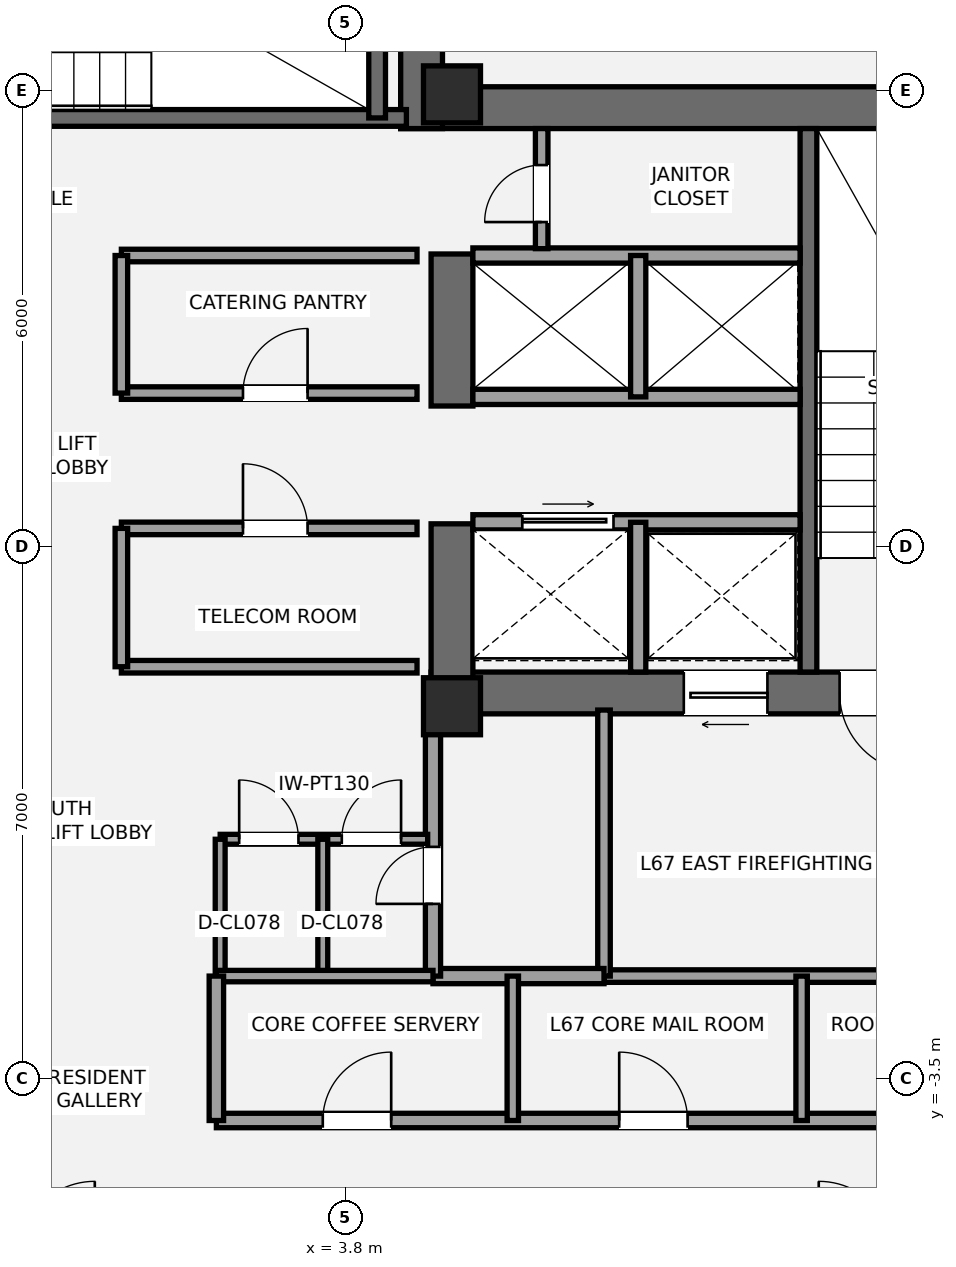
"""IFC4 building model, lengths in metres.
Left out: names, types, materials, properties, quantities, classifications, styles, units other than length and angle.
Written with IfcOpenShell. Run it as: python <this file> out.ifc"""

import sys

from ifc_helpers import new_model, si_unit, direction, frame, frame_2d, origin, origin_2d, place, context, subcontext, project, spatial, rectangle, extrude, element, fill, save


model = new_model("IFC4")
c1 = context("Model", 3, precision=1e-05, world=origin(), true_north=direction((0.0, 1.0)))
c2 = subcontext(c1, "Body", "Model", "MODEL_VIEW")
j1 = project(units=[si_unit("LENGTHUNIT", "METRE"), si_unit("PLANEANGLEUNIT", "RADIAN")], contexts=[c1])
p1 = place(None, origin())
s1 = spatial("IfcSite", under=j1, at=p1, CompositionType="ELEMENT")
p2 = place(p1, origin())
s2 = spatial("IfcBuilding", under=s1, at=p2, CompositionType="ELEMENT")
p3 = place(p2, frame((0.0, 0.0, 238.35)))
s3 = spatial("IfcBuildingStorey", under=s2, at=p3, CompositionType="ELEMENT", Elevation=238.35)
p4 = place(p3, frame((4.525, 9.275, 0.0), z_axis=(0.0, 0.0, 1.0), x_axis=(1.0, 0.0, 0.0)))
e1 = element("IfcWall", 1, at=p4, inside=s3, PredefinedType="SHEAR", context=c2, shape_type="SweptSolid", body=[
    extrude(rectangle(XDim=9.175, YDim=0.55, at=frame_2d((4.587, 0.0))), origin(), (0.0, 0.0, 1.0), 3.15),
])
p5 = place(p3, frame((13.7, 1.575, 0.0), z_axis=(0.0, 0.0, 1.0), x_axis=(-1.0, 0.0, 0.0)))
e2 = element("IfcWall", 2, at=p5, inside=s3, PredefinedType="SHEAR", context=c2, shape_type="SweptSolid", body=[
    extrude(rectangle(XDim=8.775, YDim=0.55, at=frame_2d((4.387, 0.0))), origin(), (0.0, 0.0, 1.0), 3.15),
])
p6 = place(p5, frame((2.35, 0.0, 0.0)))
e3 = element("IfcOpeningElement", 3, at=p6, cuts=e2, PredefinedType="OPENING", context=c2, shape_type="SweptSolid", body=[
    extrude(rectangle(XDim=1.05, YDim=2.15, at=frame_2d((0.525, 1.075))), frame((0.0, 0.285, 0.0), z_axis=(0.0, -1.0, 0.0), x_axis=(1.0, 0.0, 0.0)), (0.0, 0.0, 1.0), 0.57),
])
p7 = place(p5, frame((4.35, 0.0, 0.0)))
e4 = element("IfcOpeningElement", 4, at=p7, cuts=e2, PredefinedType="OPENING", context=c2, shape_type="SweptSolid", body=[
    extrude(rectangle(XDim=1.1, YDim=2.2, at=frame_2d((0.55, 1.1))), frame((0.0, 0.285, 0.0), z_axis=(0.0, -1.0, 0.0), x_axis=(1.0, 0.0, 0.0)), (0.0, 0.0, 1.0), 0.57),
])
p8 = place(p3, frame((5.2, 1.3, 0.0), z_axis=(0.0, 0.0, 1.0), x_axis=(0.0, 1.0, 0.0)))
e5 = element("IfcWall", 5, at=p8, inside=s3, PredefinedType="SHEAR", context=c2, shape_type="SweptSolid", body=[
    extrude(rectangle(XDim=2.5, YDim=0.55, at=frame_2d((1.25, 0.0))), origin(), (0.0, 0.0, 1.0), 3.15),
])
p9 = place(p3, frame((5.2, 5.35, 0.0), z_axis=(0.0, 0.0, 1.0), x_axis=(0.0, 1.0, 0.0)))
e6 = element("IfcWall", 6, at=p9, inside=s3, PredefinedType="SHEAR", context=c2, shape_type="SweptSolid", body=[
    extrude(rectangle(XDim=2.0, YDim=0.55, at=frame_2d((1.0, 0.0))), origin(), (0.0, 0.0, 1.0), 3.15),
])
p10 = place(p3, frame((9.89, 1.85, 0.0), z_axis=(0.0, 0.0, 1.0), x_axis=(0.0, 1.0, 0.0)))
e7 = element("IfcWall", 7, at=p10, inside=s3, PredefinedType="SHEAR", context=c2, shape_type="SweptSolid", body=[
    extrude(rectangle(XDim=7.15, YDim=0.22, at=frame_2d((3.575, 0.0))), origin(), (0.0, 0.0, 1.0), 3.15),
])
p11 = place(p3, frame((4.8, 9.0, 0.0), z_axis=(0.0, 0.0, 1.0), x_axis=(0.0, 1.0, 0.0)))
e8 = element("IfcWall", 8, at=p11, inside=s3, PredefinedType="SHEAR", context=c2, shape_type="SweptSolid", body=[
    extrude(rectangle(XDim=3.95, YDim=0.55, at=frame_2d((1.975, 0.0))), origin(), (0.0, 0.0, 1.0), 3.15),
])
p12 = place(p3, frame((-4.7, 9.14, 0.0), z_axis=(0.0, 0.0, 1.0), x_axis=(1.0, 0.0, 0.0)))
e9 = element("IfcWall", 9, at=p12, inside=s3, PredefinedType="SHEAR", context=c2, shape_type="SweptSolid", body=[
    extrude(rectangle(XDim=9.3, YDim=0.22, at=frame_2d((4.65, 0.0))), origin(), (0.0, 0.0, 1.0), 3.15),
])
p13 = place(p12, frame((1.15, 0.0, 0.0)))
e10 = element("IfcOpeningElement", 10, at=p13, cuts=e9, PredefinedType="OPENING", context=c2, shape_type="SweptSolid", body=[
    extrude(rectangle(XDim=1.05, YDim=2.15, at=frame_2d((0.525, 1.075))), frame((0.0, 0.12, 0.0), z_axis=(0.0, -1.0, 0.0), x_axis=(1.0, 0.0, 0.0)), (0.0, 0.0, 1.0), 0.24),
])
p14 = place(p3, frame((4.215, 9.14, 0.0), z_axis=(0.0, 0.0, 1.0), x_axis=(0.0, 1.0, 0.0)))
e11 = element("IfcWall", 11, at=p14, inside=s3, PredefinedType="SHEAR", context=c2, shape_type="SweptSolid", body=[
    extrude(rectangle(XDim=3.26, YDim=0.22, at=frame_2d((1.63, 0.0))), origin(), (0.0, 0.0, 1.0), 3.15),
])
for number, where, z_axis, x_axis in (
    (12, (5.2, 1.4, 0.0), (0.0, 0.0, 1.0), (1.0, 0.0, 0.0)),
    (13, (5.2, 9.45, 0.0), (0.0, 0.0, 1.0), (1.0, 0.0, 0.0)),
):
    element("IfcColumn", number, at=place(p3, frame(where, z_axis=z_axis, x_axis=x_axis)), inside=s3, PredefinedType="PILASTER", context=c2, shape_type="SweptSolid", body=[
        extrude(rectangle(XDim=0.75, YDim=0.75, at=origin_2d()), origin(), (0.0, 0.0, 1.0), 3.15),
    ])
p15 = place(p3, frame((7.2, -2.15, 0.0), z_axis=(0.0, 0.0, 1.0), x_axis=(1.0, 0.0, 0.0)))
e14 = element("IfcWall", 14, at=p15, inside=s3, PredefinedType="PARTITIONING", context=c2, shape_type="SweptSolid", body=[
    extrude(rectangle(XDim=6.25, YDim=0.165, at=frame_2d((3.125, 0.0))), origin(), (0.0, 0.0, 1.0), 2.97),
])
p16 = place(p3, frame((7.2, -2.15, 0.0), z_axis=(0.0, 0.0, 1.0), x_axis=(0.0, 1.0, 0.0)))
e15 = element("IfcWall", 15, at=p16, inside=s3, PredefinedType="PARTITIONING", context=c2, shape_type="SweptSolid", body=[
    extrude(rectangle(XDim=3.5, YDim=0.165, at=frame_2d((1.75, 0.0))), origin(), (0.0, 0.0, 1.0), 2.423),
])
p17 = place(p3, frame((4.95, -2.15, 0.0), z_axis=(0.0, 0.0, 1.0), x_axis=(1.0, 0.0, 0.0)))
e16 = element("IfcWall", 16, at=p17, inside=s3, PredefinedType="SOLIDWALL", context=c2, shape_type="SweptSolid", body=[
    extrude(rectangle(XDim=2.25, YDim=0.2, at=frame_2d((1.125, 0.0))), origin(), (0.0, 0.0, 1.0), 2.97),
])
p18 = place(p3, frame((4.95, -2.15, 0.0), z_axis=(0.0, 0.0, 1.0), x_axis=(0.0, 1.0, 0.0)))
e17 = element("IfcWall", 17, at=p18, inside=s3, PredefinedType="SOLIDWALL", context=c2, shape_type="SweptSolid", body=[
    extrude(rectangle(XDim=3.5, YDim=0.2, at=frame_2d((1.75, 0.0))), origin(), (0.0, 0.0, 1.0), 2.423),
])
p19 = place(p18, frame((0.95, 0.0, 0.0)))
e18 = element("IfcOpeningElement", 18, at=p19, cuts=e17, PredefinedType="OPENING", context=c2, shape_type="SweptSolid", body=[
    extrude(rectangle(XDim=0.75, YDim=2.1, at=frame_2d((0.375, 1.05))), frame((0.0, 0.11, 0.0), z_axis=(0.0, -1.0, 0.0), x_axis=(1.0, 0.0, 0.0)), (0.0, 0.0, 1.0), 0.22),
])
p20 = place(p3, frame((2.15, -0.35, 0.0), z_axis=(0.0, 0.0, 1.0), x_axis=(1.0, 0.0, 0.0)))
e19 = element("IfcWall", 19, at=p20, inside=s3, PredefinedType="PARTITIONING", context=c2, shape_type="SweptSolid", body=[
    extrude(rectangle(XDim=2.73, YDim=0.13, at=frame_2d((1.365, 0.0))), origin(), (0.0, 0.0, 1.0), 2.97),
])
p21 = place(p20, frame((0.25, 0.0, 0.0)))
e20 = element("IfcOpeningElement", 20, at=p21, cuts=e19, PredefinedType="OPENING", context=c2, shape_type="SweptSolid", body=[
    extrude(rectangle(XDim=0.78, YDim=2.1, at=frame_2d((0.39, 1.05))), frame((0.0, 0.075, 0.0), z_axis=(0.0, -1.0, 0.0), x_axis=(1.0, 0.0, 0.0)), (0.0, 0.0, 1.0), 0.15),
])
p22 = place(p20, frame((1.6, 0.0, 0.0)))
e21 = element("IfcOpeningElement", 21, at=p22, cuts=e19, PredefinedType="OPENING", context=c2, shape_type="SweptSolid", body=[
    extrude(rectangle(XDim=0.78, YDim=2.1, at=frame_2d((0.39, 1.05))), frame((0.0, 0.075, 0.0), z_axis=(0.0, -1.0, 0.0), x_axis=(1.0, 0.0, 0.0)), (0.0, 0.0, 1.0), 0.15),
])
for number, where, z_axis, x_axis in (
    (22, (2.15, -2.15, 0.0), (0.0, 0.0, 1.0), (0.0, 1.0, 0.0)),
    (23, (3.5, -2.15, 0.0), (0.0, 0.0, 1.0), (0.0, 1.0, 0.0)),
):
    element("IfcWall", number, at=place(p3, frame(where, z_axis=z_axis, x_axis=x_axis)), inside=s3, PredefinedType="PARTITIONING", context=c2, shape_type="SweptSolid", body=[
        extrude(rectangle(XDim=1.8, YDim=0.13, at=frame_2d((0.9, 0.0))), origin(), (0.0, 0.0, 1.0), 2.97),
    ])
p23 = place(p3, frame((5.475, 3.82, 0.0), z_axis=(0.0, 0.0, 1.0), x_axis=(1.0, 0.0, 0.0)))
e24 = element("IfcWall", 24, at=p23, inside=s3, PredefinedType="SOLIDWALL", context=c2, shape_type="SweptSolid", body=[
    extrude(rectangle(XDim=4.305, YDim=0.2, at=frame_2d((2.152, 0.0))), origin(), (0.0, 0.0, 1.0), 2.97),
])
p24 = place(p23, frame((0.65, 0.0, 0.0)))
e25 = element("IfcOpeningElement", 25, at=p24, cuts=e24, PredefinedType="OPENING", context=c2, shape_type="SweptSolid", body=[
    extrude(rectangle(XDim=1.2, YDim=2.2, at=frame_2d((0.6, 1.1))), frame((0.0, 0.11, 0.0), z_axis=(0.0, -1.0, 0.0), x_axis=(1.0, 0.0, 0.0)), (0.0, 0.0, 1.0), 0.22),
])
p25 = place(p3, frame((7.65, 1.85, 0.0), z_axis=(0.0, 0.0, 1.0), x_axis=(0.0, 1.0, 0.0)))
e26 = element("IfcWall", 26, at=p25, inside=s3, PredefinedType="SOLIDWALL", context=c2, shape_type="SweptSolid", body=[
    extrude(rectangle(XDim=1.97, YDim=0.2, at=frame_2d((0.985, 0.0))), origin(), (0.0, 0.0, 1.0), 2.97),
])
for number, where, z_axis, x_axis in (
    (27, (5.475, 5.47, 0.0), (0.0, 0.0, 1.0), (1.0, 0.0, 0.0)),
    (28, (5.475, 7.33, 0.0), (0.0, 0.0, 1.0), (1.0, 0.0, 0.0)),
):
    element("IfcWall", number, at=place(p3, frame(where, z_axis=z_axis, x_axis=x_axis)), inside=s3, PredefinedType="SOLIDWALL", context=c2, shape_type="SweptSolid", body=[
        extrude(rectangle(XDim=4.305, YDim=0.2, at=frame_2d((2.152, 0.0))), origin(), (0.0, 0.0, 1.0), 2.97),
    ])
p26 = place(p3, frame((7.65, 5.47, 0.0), z_axis=(0.0, 0.0, 1.0), x_axis=(0.0, 1.0, 0.0)))
e29 = element("IfcWall", 29, at=p26, inside=s3, PredefinedType="SOLIDWALL", context=c2, shape_type="SweptSolid", body=[
    extrude(rectangle(XDim=1.86, YDim=0.2, at=frame_2d((0.93, 0.0))), origin(), (0.0, 0.0, 1.0), 2.97),
])
p27 = place(p3, frame((0.85, 1.92, 0.0), z_axis=(0.0, 0.0, 1.0), x_axis=(1.0, 0.0, 0.0)))
e30 = element("IfcWall", 30, at=p27, inside=s3, PredefinedType="PARTITIONING", context=c2, shape_type="SweptSolid", body=[
    extrude(rectangle(XDim=3.89, YDim=0.165, at=frame_2d((1.945, 0.0))), origin(), (0.0, 0.0, 1.0), 2.11),
])
p28 = place(p3, frame((0.85, 3.74, 0.0), z_axis=(0.0, 0.0, 1.0), x_axis=(1.0, 0.0, 0.0)))
e31 = element("IfcWall", 31, at=p28, inside=s3, PredefinedType="PARTITIONING", context=c2, shape_type="SweptSolid", body=[
    extrude(rectangle(XDim=3.89, YDim=0.165, at=frame_2d((1.945, 0.0))), origin(), (0.0, 0.0, 1.0), 2.97),
])
p29 = place(p28, frame((1.6, 0.0, 0.0)))
e32 = element("IfcOpeningElement", 32, at=p29, cuts=e31, PredefinedType="OPENING", context=c2, shape_type="SweptSolid", body=[
    extrude(rectangle(XDim=0.85, YDim=2.1, at=frame_2d((0.425, 1.05))), frame((0.0, 0.093, 0.0), z_axis=(0.0, -1.0, 0.0), x_axis=(1.0, 0.0, 0.0)), (0.0, 0.0, 1.0), 0.185),
])
p30 = place(p3, frame((0.85, 1.92, 0.0), z_axis=(0.0, 0.0, 1.0), x_axis=(0.0, 1.0, 0.0)))
e33 = element("IfcWall", 33, at=p30, inside=s3, PredefinedType="PARTITIONING", context=c2, shape_type="SweptSolid", body=[
    extrude(rectangle(XDim=1.82, YDim=0.165, at=frame_2d((0.91, 0.0))), origin(), (0.0, 0.0, 1.0), 2.97),
])
p31 = place(p3, frame((0.85, 5.52, 0.0), z_axis=(0.0, 0.0, 1.0), x_axis=(1.0, 0.0, 0.0)))
e34 = element("IfcWall", 34, at=p31, inside=s3, PredefinedType="PARTITIONING", context=c2, shape_type="SweptSolid", body=[
    extrude(rectangle(XDim=3.89, YDim=0.165, at=frame_2d((1.945, 0.0))), origin(), (0.0, 0.0, 1.0), 2.97),
])
p32 = place(p31, frame((1.6, 0.0, 0.0)))
e35 = element("IfcOpeningElement", 35, at=p32, cuts=e34, PredefinedType="OPENING", context=c2, shape_type="SweptSolid", body=[
    extrude(rectangle(XDim=0.85, YDim=2.1, at=frame_2d((0.425, 1.05))), frame((0.0, 0.093, 0.0), z_axis=(0.0, -1.0, 0.0), x_axis=(1.0, 0.0, 0.0)), (0.0, 0.0, 1.0), 0.185),
])
p33 = place(p3, frame((0.85, 7.33, 0.0), z_axis=(0.0, 0.0, 1.0), x_axis=(1.0, 0.0, 0.0)))
e36 = element("IfcWall", 36, at=p33, inside=s3, PredefinedType="PARTITIONING", context=c2, shape_type="SweptSolid", body=[
    extrude(rectangle(XDim=3.89, YDim=0.165, at=frame_2d((1.945, 0.0))), origin(), (0.0, 0.0, 1.0), 2.97),
])
p34 = place(p3, frame((0.85, 5.52, 0.0), z_axis=(0.0, 0.0, 1.0), x_axis=(0.0, 1.0, 0.0)))
e37 = element("IfcWall", 37, at=p34, inside=s3, PredefinedType="PARTITIONING", context=c2, shape_type="SweptSolid", body=[
    extrude(rectangle(XDim=1.81, YDim=0.165, at=frame_2d((0.905, 0.0))), origin(), (0.0, 0.0, 1.0), 2.97),
])
p35 = place(p3, frame((6.38, 7.42, 0.0), z_axis=(0.0, 0.0, 1.0), x_axis=(0.0, 1.0, 0.0)))
e38 = element("IfcWall", 38, at=p35, inside=s3, PredefinedType="PARTITIONING", context=c2, shape_type="SweptSolid", body=[
    extrude(rectangle(XDim=1.58, YDim=0.165, at=frame_2d((0.79, 0.0))), origin(), (0.0, 0.0, 1.0), 2.97),
])
p36 = place(p35, frame((0.35, 0.0, 0.0)))
e39 = element("IfcOpeningElement", 39, at=p36, cuts=e38, PredefinedType="OPENING", context=c2, shape_type="SweptSolid", body=[
    extrude(rectangle(XDim=0.75, YDim=2.1, at=frame_2d((0.375, 1.05))), frame((0.0, 0.093, 0.0), z_axis=(0.0, -1.0, 0.0), x_axis=(1.0, 0.0, 0.0)), (0.0, 0.0, 1.0), 0.185),
])
p37 = place(p3, frame((2.1, -4.05, 0.0), z_axis=(0.0, 0.0, 1.0), x_axis=(1.0, 0.0, 0.0)))
e40 = element("IfcWall", 40, at=p37, inside=s3, PredefinedType="PLUMBINGWALL", context=c2, shape_type="SweptSolid", body=[
    extrude(rectangle(XDim=11.35, YDim=0.19, at=frame_2d((5.675, 0.0))), origin(), (0.0, 0.0, 1.0), 2.357),
])
p38 = place(p37, frame((1.4, 0.0, 0.0)))
e41 = element("IfcOpeningElement", 41, at=p38, cuts=e40, PredefinedType="OPENING", context=c2, shape_type="SweptSolid", body=[
    extrude(rectangle(XDim=0.9, YDim=2.1, at=frame_2d((0.45, 1.05))), frame((0.0, 0.105, 0.0), z_axis=(0.0, -1.0, 0.0), x_axis=(1.0, 0.0, 0.0)), (0.0, 0.0, 1.0), 0.21),
])
p39 = place(p37, frame((5.3, 0.0, 0.0)))
e42 = element("IfcOpeningElement", 42, at=p39, cuts=e40, PredefinedType="OPENING", context=c2, shape_type="SweptSolid", body=[
    extrude(rectangle(XDim=0.9, YDim=2.1, at=frame_2d((0.45, 1.05))), frame((0.0, 0.105, 0.0), z_axis=(0.0, -1.0, 0.0), x_axis=(1.0, 0.0, 0.0)), (0.0, 0.0, 1.0), 0.21),
])
p40 = place(p37, frame((9.1, 0.0, 0.0)))
e43 = element("IfcOpeningElement", 43, at=p40, cuts=e40, PredefinedType="OPENING", context=c2, shape_type="SweptSolid", body=[
    extrude(rectangle(XDim=0.9, YDim=2.1, at=frame_2d((0.45, 1.05))), frame((0.0, 0.105, 0.0), z_axis=(0.0, -1.0, 0.0), x_axis=(1.0, 0.0, 0.0)), (0.0, 0.0, 1.0), 0.21),
])
p41 = place(p3, frame((2.1, -2.15, 0.0), z_axis=(0.0, 0.0, 1.0), x_axis=(1.0, 0.0, 0.0)))
e44 = element("IfcWall", 44, at=p41, inside=s3, PredefinedType="PLUMBINGWALL", context=c2, shape_type="SweptSolid", body=[
    extrude(rectangle(XDim=2.85, YDim=0.15, at=frame_2d((1.425, 0.0))), origin(), (0.0, 0.0, 1.0), 2.97),
])
p42 = place(p3, frame((2.1, -4.05, 0.0), z_axis=(0.0, 0.0, 1.0), x_axis=(0.0, 1.0, 0.0)))
e45 = element("IfcWall", 45, at=p42, inside=s3, PredefinedType="PLUMBINGWALL", context=c2, shape_type="SweptSolid", body=[
    extrude(rectangle(XDim=1.9, YDim=0.19, at=frame_2d((0.95, 0.0))), origin(), (0.0, 0.0, 1.0), 2.97),
])
p43 = place(p3, frame((6.0, -4.05, 0.0), z_axis=(0.0, 0.0, 1.0), x_axis=(0.0, 1.0, 0.0)))
e46 = element("IfcWall", 46, at=p43, inside=s3, PredefinedType="PLUMBINGWALL", context=c2, shape_type="SweptSolid", body=[
    extrude(rectangle(XDim=1.9, YDim=0.15, at=frame_2d((0.95, 0.0))), origin(), (0.0, 0.0, 1.0), 2.431),
])
p44 = place(p3, frame((9.8, -4.05, 0.0), z_axis=(0.0, 0.0, 1.0), x_axis=(0.0, 1.0, 0.0)))
e47 = element("IfcWall", 47, at=p44, inside=s3, PredefinedType="PLUMBINGWALL", context=c2, shape_type="SweptSolid", body=[
    extrude(rectangle(XDim=1.9, YDim=0.15, at=frame_2d((0.95, 0.0))), origin(), (0.0, 0.0, 1.0), 2.97),
])
p45 = place(p6, origin())
e48 = element("IfcDoor", 48, at=p45, inside=s3, OperationType="SINGLE_SWING_LEFT", PredefinedType="DOOR", context=c2, shape_type="SweptSolid", body=[
    extrude(rectangle(XDim=1.05, YDim=2.15, at=frame_2d((0.525, 1.075))), frame((0.0, 0.025, 0.0), z_axis=(0.0, -1.0, 0.0), x_axis=(1.0, 0.0, 0.0)), (0.0, 0.0, 1.0), 0.05),
])
fill(e3, e48)
p46 = place(p19, origin())
e49 = element("IfcDoor", 49, at=p46, inside=s3, OperationType="SINGLE_SWING_LEFT", PredefinedType="DOOR", context=c2, shape_type="SweptSolid", body=[
    extrude(rectangle(XDim=0.75, YDim=2.1, at=frame_2d((0.375, 1.05))), frame((0.0, 0.025, 0.0), z_axis=(0.0, -1.0, 0.0), x_axis=(1.0, 0.0, 0.0)), (0.0, 0.0, 1.0), 0.05),
])
fill(e18, e49)
p47 = place(p21, origin())
e50 = element("IfcDoor", 50, at=p47, inside=s3, OperationType="SINGLE_SWING_LEFT", PredefinedType="DOOR", context=c2, shape_type="SweptSolid", body=[
    extrude(rectangle(XDim=0.78, YDim=2.1, at=frame_2d((0.39, 1.05))), frame((0.0, 0.025, 0.0), z_axis=(0.0, -1.0, 0.0), x_axis=(1.0, 0.0, 0.0)), (0.0, 0.0, 1.0), 0.05),
])
fill(e20, e50)
p48 = place(p22, origin())
e51 = element("IfcDoor", 51, at=p48, inside=s3, OperationType="SINGLE_SWING_RIGHT", PredefinedType="DOOR", context=c2, shape_type="SweptSolid", body=[
    extrude(rectangle(XDim=0.78, YDim=2.1, at=frame_2d((0.39, 1.05))), frame((0.0, 0.025, 0.0), z_axis=(0.0, -1.0, 0.0), x_axis=(1.0, 0.0, 0.0)), (0.0, 0.0, 1.0), 0.05),
])
fill(e21, e51)
p49 = place(p7, origin())
e52 = element("IfcDoor", 52, at=p49, inside=s3, OperationType="SLIDING_TO_LEFT", PredefinedType="DOOR", context=c2, shape_type="SweptSolid", body=[
    extrude(rectangle(XDim=1.1, YDim=2.2, at=frame_2d((0.55, 1.1))), frame((0.0, 0.025, 0.0), z_axis=(0.0, -1.0, 0.0), x_axis=(1.0, 0.0, 0.0)), (0.0, 0.0, 1.0), 0.05),
])
fill(e4, e52)
p50 = place(p24, origin())
e53 = element("IfcDoor", 53, at=p50, inside=s3, OperationType="SLIDING_TO_RIGHT", PredefinedType="DOOR", context=c2, shape_type="SweptSolid", body=[
    extrude(rectangle(XDim=1.2, YDim=2.2, at=frame_2d((0.6, 1.1))), frame((0.0, 0.025, 0.0), z_axis=(0.0, -1.0, 0.0), x_axis=(1.0, 0.0, 0.0)), (0.0, 0.0, 1.0), 0.05),
])
fill(e25, e53)
p51 = place(p29, origin())
e54 = element("IfcDoor", 54, at=p51, inside=s3, OperationType="SINGLE_SWING_LEFT", PredefinedType="DOOR", context=c2, shape_type="SweptSolid", body=[
    extrude(rectangle(XDim=0.85, YDim=2.1, at=frame_2d((0.425, 1.05))), frame((0.0, 0.025, 0.0), z_axis=(0.0, -1.0, 0.0), x_axis=(1.0, 0.0, 0.0)), (0.0, 0.0, 1.0), 0.05),
])
fill(e32, e54)
p52 = place(p32, origin())
e55 = element("IfcDoor", 55, at=p52, inside=s3, OperationType="SINGLE_SWING_RIGHT", PredefinedType="DOOR", context=c2, shape_type="SweptSolid", body=[
    extrude(rectangle(XDim=0.85, YDim=2.1, at=frame_2d((0.425, 1.05))), frame((0.0, 0.025, 0.0), z_axis=(0.0, -1.0, 0.0), x_axis=(1.0, 0.0, 0.0)), (0.0, 0.0, 1.0), 0.05),
])
fill(e35, e55)
p53 = place(p36, origin())
e56 = element("IfcDoor", 56, at=p53, inside=s3, OperationType="SINGLE_SWING_LEFT", PredefinedType="DOOR", context=c2, shape_type="SweptSolid", body=[
    extrude(rectangle(XDim=0.75, YDim=2.1, at=frame_2d((0.375, 1.05))), frame((0.0, 0.025, 0.0), z_axis=(0.0, -1.0, 0.0), x_axis=(1.0, 0.0, 0.0)), (0.0, 0.0, 1.0), 0.05),
])
fill(e39, e56)
p54 = place(p38, origin())
e57 = element("IfcDoor", 57, at=p54, inside=s3, OperationType="SINGLE_SWING_RIGHT", PredefinedType="DOOR", context=c2, shape_type="SweptSolid", body=[
    extrude(rectangle(XDim=0.9, YDim=2.1, at=frame_2d((0.45, 1.05))), frame((0.0, 0.025, 0.0), z_axis=(0.0, -1.0, 0.0), x_axis=(1.0, 0.0, 0.0)), (0.0, 0.0, 1.0), 0.05),
])
fill(e41, e57)
p55 = place(p39, origin())
e58 = element("IfcDoor", 58, at=p55, inside=s3, OperationType="SINGLE_SWING_LEFT", PredefinedType="DOOR", context=c2, shape_type="SweptSolid", body=[
    extrude(rectangle(XDim=0.9, YDim=2.1, at=frame_2d((0.45, 1.05))), frame((0.0, 0.025, 0.0), z_axis=(0.0, -1.0, 0.0), x_axis=(1.0, 0.0, 0.0)), (0.0, 0.0, 1.0), 0.05),
])
fill(e42, e58)
save(model, sys.argv[1])
